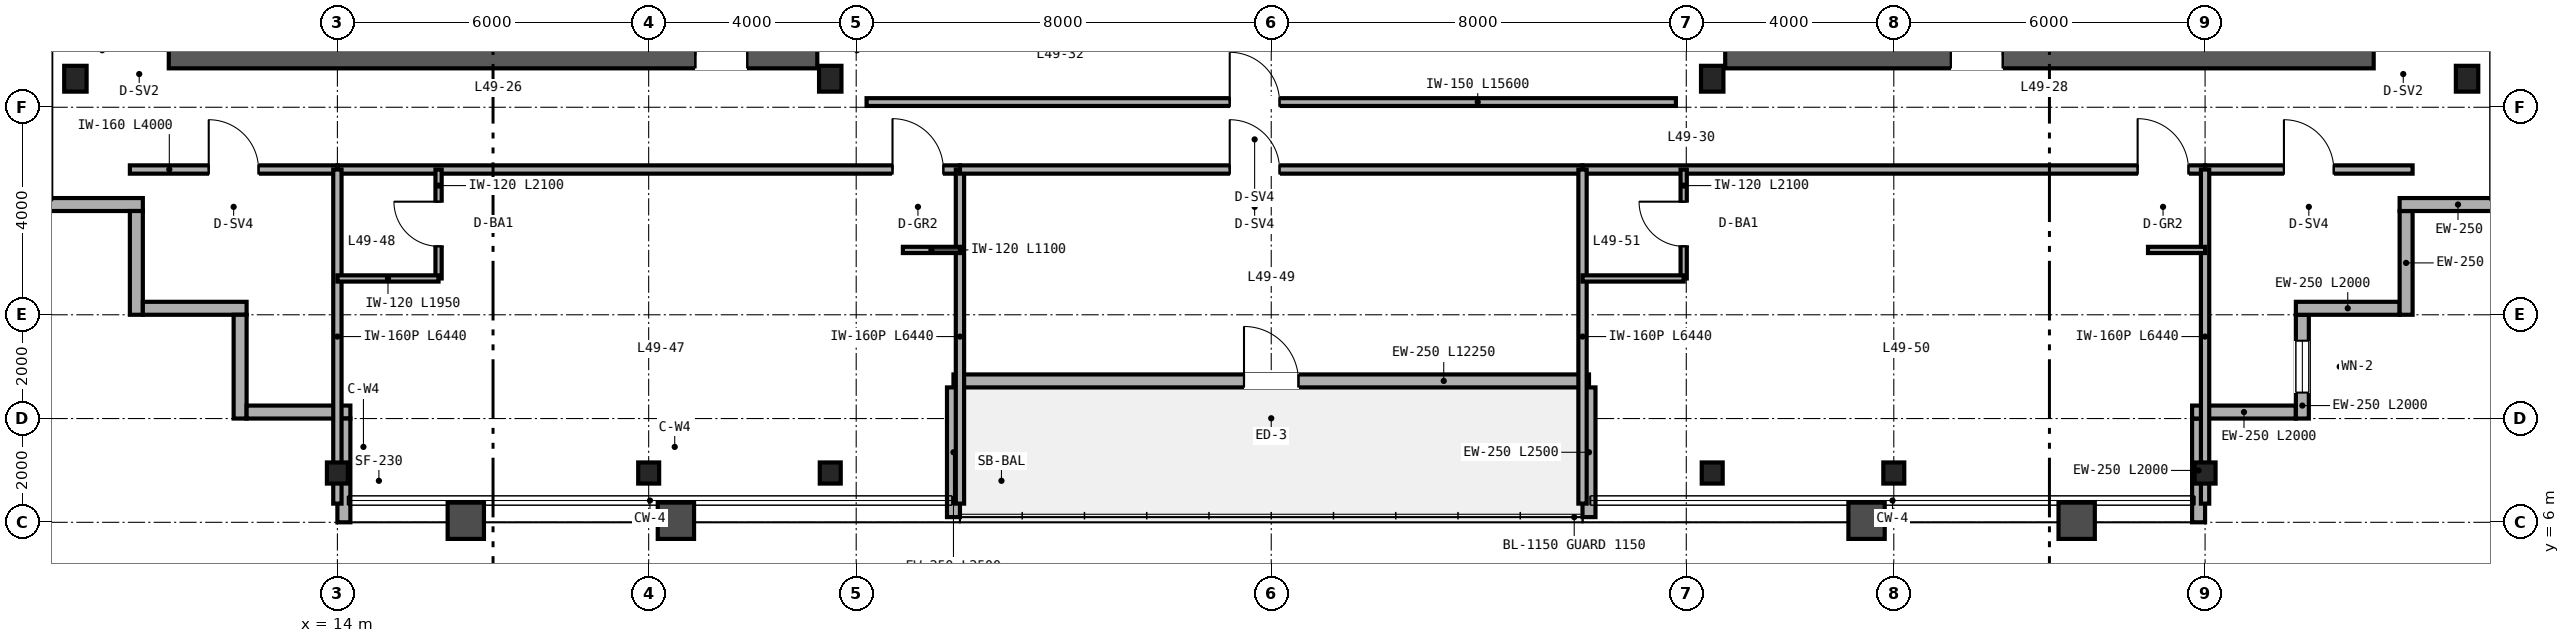
"""IFC4 building model, lengths in metres.
Left out: names, types, materials, properties, quantities, classifications, styles, units other than length and angle.
Written with IfcOpenShell. Run it as: python <this file> out.ifc"""

import sys

from ifc_helpers import new_model, si_unit, direction, frame, frame_2d, origin, origin_2d, place, context, subcontext, project, spatial, rectangle, i_section, extrude, source, transform, mapped, element, fill, save


model = new_model("IFC4")
c1 = context("Model", 3, precision=1e-05, world=origin(), true_north=direction((0.0, 1.0)))
c2 = subcontext(c1, "Body", "Model", "MODEL_VIEW")
j1 = project(units=[si_unit("LENGTHUNIT", "METRE"), si_unit("PLANEANGLEUNIT", "RADIAN")], contexts=[c1])
p1 = place(None, origin())
s1 = spatial("IfcSite", under=j1, at=p1, CompositionType="ELEMENT")
p2 = place(p1, origin())
s2 = spatial("IfcBuilding", under=s1, at=p2, CompositionType="ELEMENT")
p3 = place(p2, frame((0.0, 0.0, 195.6)))
s3 = spatial("IfcBuildingStorey", under=s2, at=p3, CompositionType="ELEMENT", Elevation=195.6)
p4 = place(p3, frame((10.75, 15.0, 0.0), z_axis=(0.0, 0.0, 1.0), x_axis=(1.0, 0.0, 0.0)))
e1 = element("IfcWall", 1, at=p4, inside=s3, PredefinedType="SHEAR", context=c2, shape_type="SweptSolid", body=[
    extrude(rectangle(XDim=12.5, YDim=0.5, at=frame_2d((6.25, 0.0))), origin(), (0.0, 0.0, 1.0), 3.37),
])
p5 = place(p4, frame((10.15, 0.0, 0.0)))
e2 = element("IfcOpeningElement", 2, at=p5, cuts=e1, PredefinedType="OPENING", context=c2, shape_type="SweptSolid", body=[
    extrude(rectangle(XDim=1.0, YDim=2.15, at=frame_2d((0.5, 1.075))), frame((0.0, 0.26, 0.0), z_axis=(0.0, -1.0, 0.0), x_axis=(1.0, 0.0, 0.0)), (0.0, 0.0, 1.0), 0.52),
])
p6 = place(p3, frame((40.75, 15.0, 0.0), z_axis=(0.0, 0.0, 1.0), x_axis=(1.0, 0.0, 0.0)))
e3 = element("IfcWall", 3, at=p6, inside=s3, PredefinedType="SHEAR", context=c2, shape_type="SweptSolid", body=[
    extrude(rectangle(XDim=12.5, YDim=0.5, at=frame_2d((6.25, 0.0))), origin(), (0.0, 0.0, 1.0), 3.37),
])
p7 = place(p6, frame((4.35, 0.0, 0.0)))
e4 = element("IfcOpeningElement", 4, at=p7, cuts=e3, PredefinedType="OPENING", context=c2, shape_type="SweptSolid", body=[
    extrude(rectangle(XDim=1.0, YDim=2.15, at=frame_2d((0.5, 1.075))), frame((0.0, 0.26, 0.0), z_axis=(0.0, -1.0, 0.0), x_axis=(1.0, 0.0, 0.0)), (0.0, 0.0, 1.0), 0.52),
])
m1 = source(origin(), c2, "Body", "SweptSolid", [
    extrude(i_section(OverallWidth=0.432, OverallDepth=0.498, WebThickness=0.056, FlangeThickness=0.089, FilletRadius=0.025, at=origin_2d()), origin(), (0.0, 0.0, 1.0), 3.37),
])
for number, where, z_axis, x_axis in (
    (5, (8.95, 14.55, 0.0), (0.0, 0.0, 1.0), (1.0, 0.0, 0.0)),
    (6, (23.5, 14.55, 0.0), (0.0, 0.0, 1.0), (1.0, 0.0, 0.0)),
    (7, (40.5, 14.55, 0.0), (0.0, 0.0, 1.0), (1.0, 0.0, 0.0)),
    (8, (55.05, 14.55, 0.0), (0.0, 0.0, 1.0), (1.0, 0.0, 0.0)),
):
    element("IfcColumn", number, at=place(p3, frame(where, z_axis=z_axis, x_axis=x_axis)), inside=s3, PredefinedType="COLUMN", context=c2, shape_type="MappedRepresentation", body=[
        mapped(m1, transform((0.0, 0.0, 0.0), scale=1.0)),
    ])
m2 = source(origin(), c2, "Body", "SweptSolid", [
    extrude(i_section(OverallWidth=0.404, OverallDepth=0.407, WebThickness=0.027, FlangeThickness=0.044, FilletRadius=0.025, at=origin_2d()), origin(), (0.0, 0.0, 1.0), 3.37),
])
for number, where, z_axis, x_axis in (
    (9, (14.0, 6.95, 0.0), (0.0, 0.0, 1.0), (1.0, 0.0, 0.0)),
    (10, (20.0, 6.95, 0.0), (0.0, 0.0, 1.0), (1.0, 0.0, 0.0)),
    (11, (23.5, 6.95, 0.0), (0.0, 0.0, 1.0), (1.0, 0.0, 0.0)),
    (12, (40.5, 6.95, 0.0), (0.0, 0.0, 1.0), (1.0, 0.0, 0.0)),
    (13, (44.0, 6.95, 0.0), (0.0, 0.0, 1.0), (1.0, 0.0, 0.0)),
    (14, (50.0, 6.95, 0.0), (0.0, 0.0, 1.0), (1.0, 0.0, 0.0)),
):
    element("IfcColumn", number, at=place(p3, frame(where, z_axis=z_axis, x_axis=x_axis)), inside=s3, PredefinedType="COLUMN", context=c2, shape_type="MappedRepresentation", body=[
        mapped(m2, transform((0.0, 0.0, 0.0), scale=1.0)),
    ])
p8 = place(p3, frame((49.875, 6.0, 0.0), z_axis=(0.0, 0.0, 1.0), x_axis=(0.0, 1.0, 0.0)))
e15 = element("IfcWall", 15, at=p8, inside=s3, PredefinedType="SOLIDWALL", context=c2, shape_type="SweptSolid", body=[
    extrude(rectangle(XDim=2.0, YDim=0.25, at=frame_2d((1.0, 0.0))), origin(), (0.0, 0.0, 1.0), 2.677),
])
p9 = place(p3, frame((49.75, 8.125, 0.0), z_axis=(0.0, 0.0, 1.0), x_axis=(1.0, 0.0, 0.0)))
e16 = element("IfcWall", 16, at=p9, inside=s3, PredefinedType="SOLIDWALL", context=c2, shape_type="SweptSolid", body=[
    extrude(rectangle(XDim=2.0, YDim=0.25, at=frame_2d((1.0, 0.0))), origin(), (0.0, 0.0, 1.0), 3.37),
])
p10 = place(p3, frame((51.875, 8.0, 0.0), z_axis=(0.0, 0.0, 1.0), x_axis=(0.0, 1.0, 0.0)))
e17 = element("IfcWall", 17, at=p10, inside=s3, PredefinedType="SOLIDWALL", context=c2, shape_type="SweptSolid", body=[
    extrude(rectangle(XDim=2.0, YDim=0.25, at=frame_2d((1.0, 0.0))), origin(), (0.0, 0.0, 1.0), 3.37),
])
p11 = place(p10, frame((0.5, 0.0, 0.85)))
e18 = element("IfcOpeningElement", 18, at=p11, cuts=e17, PredefinedType="OPENING", context=c2, shape_type="SweptSolid", body=[
    extrude(rectangle(XDim=1.0, YDim=1.9, at=frame_2d((0.5, 0.95))), frame((0.0, 0.135, 0.0), z_axis=(0.0, -1.0, 0.0), x_axis=(1.0, 0.0, 0.0)), (0.0, 0.0, 1.0), 0.27),
])
for number, where, z_axis, x_axis in (
    (19, (51.75, 10.125, 0.0), (0.0, 0.0, 1.0), (1.0, 0.0, 0.0)),
    (20, (53.875, 10.0, 0.0), (0.0, 0.0, 1.0), (0.0, 1.0, 0.0)),
):
    element("IfcWall", number, at=place(p3, frame(where, z_axis=z_axis, x_axis=x_axis)), inside=s3, PredefinedType="SOLIDWALL", context=c2, shape_type="SweptSolid", body=[
        extrude(rectangle(XDim=2.0, YDim=0.25, at=frame_2d((1.0, 0.0))), origin(), (0.0, 0.0, 1.0), 3.37),
    ])
for number, where, z_axis, x_axis in (
    (21, (53.75, 12.125, 0.0), (0.0, 0.0, 1.0), (1.0, 0.0, 0.0)),
    (22, (8.0, 12.125, 0.0), (0.0, 0.0, 1.0), (1.0, 0.0, 0.0)),
):
    element("IfcWall", number, at=place(p3, frame(where, z_axis=z_axis, x_axis=x_axis)), inside=s3, PredefinedType="SOLIDWALL", context=c2, shape_type="SweptSolid", body=[
        extrude(rectangle(XDim=2.25, YDim=0.25, at=frame_2d((1.125, 0.0))), origin(), (0.0, 0.0, 1.0), 3.37),
    ])
for number, where, z_axis, x_axis in (
    (23, (10.125, 12.0, 0.0), (0.0, 0.0, 1.0), (0.0, -1.0, 0.0)),
    (24, (10.25, 10.125, 0.0), (0.0, 0.0, 1.0), (1.0, 0.0, 0.0)),
    (25, (12.125, 10.0, 0.0), (0.0, 0.0, 1.0), (0.0, -1.0, 0.0)),
    (26, (12.25, 8.125, 0.0), (0.0, 0.0, 1.0), (1.0, 0.0, 0.0)),
):
    element("IfcWall", number, at=place(p3, frame(where, z_axis=z_axis, x_axis=x_axis)), inside=s3, PredefinedType="SOLIDWALL", context=c2, shape_type="SweptSolid", body=[
        extrude(rectangle(XDim=2.0, YDim=0.25, at=frame_2d((1.0, 0.0))), origin(), (0.0, 0.0, 1.0), 3.37),
    ])
p12 = place(p3, frame((14.125, 8.0, 0.0), z_axis=(0.0, 0.0, 1.0), x_axis=(0.0, -1.0, 0.0)))
e27 = element("IfcWall", 27, at=p12, inside=s3, PredefinedType="SOLIDWALL", context=c2, shape_type="SweptSolid", body=[
    extrude(rectangle(XDim=2.0, YDim=0.25, at=frame_2d((1.0, 0.0))), origin(), (0.0, 0.0, 1.0), 2.677),
])
p13 = place(p3, frame((25.875, 8.725, 0.0), z_axis=(0.0, 0.0, 1.0), x_axis=(1.0, 0.0, 0.0)))
e28 = element("IfcWall", 28, at=p13, inside=s3, PredefinedType="SOLIDWALL", context=c2, shape_type="SweptSolid", body=[
    extrude(rectangle(XDim=12.25, YDim=0.25, at=frame_2d((6.125, 0.0))), origin(), (0.0, 0.0, 1.0), 3.37),
])
p14 = place(p13, frame((5.6, 0.0, 0.0)))
e29 = element("IfcOpeningElement", 29, at=p14, cuts=e28, PredefinedType="OPENING", context=c2, shape_type="SweptSolid", body=[
    extrude(rectangle(XDim=1.05, YDim=2.15, at=frame_2d((0.525, 1.075))), frame((0.0, 0.135, 0.0), z_axis=(0.0, -1.0, 0.0), x_axis=(1.0, 0.0, 0.0)), (0.0, 0.0, 1.0), 0.27),
])
for number, where, z_axis, x_axis in (
    (30, (25.875, 6.1, 0.0), (0.0, 0.0, 1.0), (0.0, 1.0, 0.0)),
    (31, (38.125, 6.1, 0.0), (0.0, 0.0, 1.0), (0.0, 1.0, 0.0)),
):
    element("IfcWall", number, at=place(p3, frame(where, z_axis=z_axis, x_axis=x_axis)), inside=s3, PredefinedType="SOLIDWALL", context=c2, shape_type="SweptSolid", body=[
        extrude(rectangle(XDim=2.5, YDim=0.25, at=frame_2d((1.25, 0.0))), origin(), (0.0, 0.0, 1.0), 2.443),
    ])
p15 = place(p3, frame((24.2, 14.1, 0.0), z_axis=(0.0, 0.0, 1.0), x_axis=(1.0, 0.0, 0.0)))
e32 = element("IfcWall", 32, at=p15, inside=s3, PredefinedType="PARTITIONING", context=c2, shape_type="SweptSolid", body=[
    extrude(rectangle(XDim=15.6, YDim=0.15, at=frame_2d((7.8, 0.0))), origin(), (0.0, 0.0, 1.0), 3.37),
])
p16 = place(p15, frame((7.0, 0.0, 0.0)))
e33 = element("IfcOpeningElement", 33, at=p16, cuts=e32, PredefinedType="OPENING", context=c2, shape_type="SweptSolid", body=[
    extrude(rectangle(XDim=0.96, YDim=2.15, at=frame_2d((0.48, 1.075))), frame((0.0, 0.085, 0.0), z_axis=(0.0, -1.0, 0.0), x_axis=(1.0, 0.0, 0.0)), (0.0, 0.0, 1.0), 0.17),
])
p17 = place(p3, frame((10.0, 12.8, 0.0), z_axis=(0.0, 0.0, 1.0), x_axis=(1.0, 0.0, 0.0)))
e34 = element("IfcWall", 34, at=p17, inside=s3, PredefinedType="PARTITIONING", context=c2, shape_type="SweptSolid", body=[
    extrude(rectangle(XDim=4.0, YDim=0.16, at=frame_2d((2.0, 0.0))), origin(), (0.0, 0.0, 1.0), 3.37),
])
p18 = place(p17, frame((1.52, 0.0, 0.0)))
e35 = element("IfcOpeningElement", 35, at=p18, cuts=e34, PredefinedType="OPENING", context=c2, shape_type="SweptSolid", body=[
    extrude(rectangle(XDim=0.96, YDim=2.15, at=frame_2d((0.48, 1.075))), frame((0.0, 0.09, 0.0), z_axis=(0.0, -1.0, 0.0), x_axis=(1.0, 0.0, 0.0)), (0.0, 0.0, 1.0), 0.18),
])
p19 = place(p3, frame((50.0, 12.8, 0.0), z_axis=(0.0, 0.0, 1.0), x_axis=(1.0, 0.0, 0.0)))
e36 = element("IfcWall", 36, at=p19, inside=s3, PredefinedType="PARTITIONING", context=c2, shape_type="SweptSolid", body=[
    extrude(rectangle(XDim=4.0, YDim=0.16, at=frame_2d((2.0, 0.0))), origin(), (0.0, 0.0, 1.0), 3.37),
])
p20 = place(p19, frame((1.52, 0.0, 0.0)))
e37 = element("IfcOpeningElement", 37, at=p20, cuts=e36, PredefinedType="OPENING", context=c2, shape_type="SweptSolid", body=[
    extrude(rectangle(XDim=0.96, YDim=2.15, at=frame_2d((0.48, 1.075))), frame((0.0, 0.09, 0.0), z_axis=(0.0, -1.0, 0.0), x_axis=(1.0, 0.0, 0.0)), (0.0, 0.0, 1.0), 0.18),
])
p21 = place(p3, frame((14.0, 12.8, 0.0), z_axis=(0.0, 0.0, 1.0), x_axis=(1.0, 0.0, 0.0)))
e38 = element("IfcWall", 38, at=p21, inside=s3, PredefinedType="PARTITIONING", context=c2, shape_type="SweptSolid", body=[
    extrude(rectangle(XDim=12.0, YDim=0.16, at=frame_2d((6.0, 0.0))), origin(), (0.0, 0.0, 1.0), 2.913),
])
p22 = place(p21, frame((10.7, 0.0, 0.0)))
e39 = element("IfcOpeningElement", 39, at=p22, cuts=e38, PredefinedType="OPENING", context=c2, shape_type="SweptSolid", body=[
    extrude(rectangle(XDim=0.98, YDim=2.2, at=frame_2d((0.49, 1.1))), frame((0.0, 0.09, 0.0), z_axis=(0.0, -1.0, 0.0), x_axis=(1.0, 0.0, 0.0)), (0.0, 0.0, 1.0), 0.18),
])
p23 = place(p3, frame((14.0, 6.36, 0.0), z_axis=(0.0, 0.0, 1.0), x_axis=(0.0, 1.0, 0.0)))
e40 = element("IfcWall", 40, at=p23, inside=s3, PredefinedType="PARTITIONING", context=c2, shape_type="SweptSolid", body=[
    extrude(rectangle(XDim=6.44, YDim=0.16, at=frame_2d((3.22, 0.0))), origin(), (0.0, 0.0, 1.0), 2.677),
])
p24 = place(p3, frame((26.0, 6.36, 0.0), z_axis=(0.0, 0.0, 1.0), x_axis=(0.0, 1.0, 0.0)))
e41 = element("IfcWall", 41, at=p24, inside=s3, PredefinedType="PARTITIONING", context=c2, shape_type="SweptSolid", body=[
    extrude(rectangle(XDim=6.44, YDim=0.16, at=frame_2d((3.22, 0.0))), origin(), (0.0, 0.0, 1.0), 2.443),
])
p25 = place(p3, frame((15.95, 10.7, 0.0), z_axis=(0.0, 0.0, 1.0), x_axis=(0.0, 1.0, 0.0)))
e42 = element("IfcWall", 42, at=p25, inside=s3, PredefinedType="PARTITIONING", context=c2, shape_type="SweptSolid", body=[
    extrude(rectangle(XDim=2.1, YDim=0.12, at=frame_2d((1.05, 0.0))), origin(), (0.0, 0.0, 1.0), 3.37),
])
p26 = place(p25, frame((0.62, 0.0, 0.0)))
e43 = element("IfcOpeningElement", 43, at=p26, cuts=e42, PredefinedType="OPENING", context=c2, shape_type="SweptSolid", body=[
    extrude(rectangle(XDim=0.86, YDim=2.1, at=frame_2d((0.43, 1.05))), frame((0.0, 0.07, 0.0), z_axis=(0.0, -1.0, 0.0), x_axis=(1.0, 0.0, 0.0)), (0.0, 0.0, 1.0), 0.14),
])
p27 = place(p3, frame((14.0, 10.7, 0.0), z_axis=(0.0, 0.0, 1.0), x_axis=(1.0, 0.0, 0.0)))
e44 = element("IfcWall", 44, at=p27, inside=s3, PredefinedType="PARTITIONING", context=c2, shape_type="SweptSolid", body=[
    extrude(rectangle(XDim=1.95, YDim=0.12, at=frame_2d((0.975, 0.0))), origin(), (0.0, 0.0, 1.0), 3.37),
])
p28 = place(p3, frame((24.9, 11.25, 0.0), z_axis=(0.0, 0.0, 1.0), x_axis=(1.0, 0.0, 0.0)))
e45 = element("IfcWall", 45, at=p28, inside=s3, PredefinedType="PARTITIONING", context=c2, shape_type="SweptSolid", body=[
    extrude(rectangle(XDim=1.1, YDim=0.12, at=frame_2d((0.55, 0.0))), origin(), (0.0, 0.0, 1.0), 3.37),
])
p29 = place(p3, frame((26.0, 12.8, 0.0), z_axis=(0.0, 0.0, 1.0), x_axis=(1.0, 0.0, 0.0)))
e46 = element("IfcWall", 46, at=p29, inside=s3, PredefinedType="PARTITIONING", context=c2, shape_type="SweptSolid", body=[
    extrude(rectangle(XDim=12.0, YDim=0.16, at=frame_2d((6.0, 0.0))), origin(), (0.0, 0.0, 1.0), 3.37),
])
p30 = place(p29, frame((5.2, 0.0, 0.0)))
e47 = element("IfcOpeningElement", 47, at=p30, cuts=e46, PredefinedType="OPENING", context=c2, shape_type="SweptSolid", body=[
    extrude(rectangle(XDim=0.96, YDim=2.15, at=frame_2d((0.48, 1.075))), frame((0.0, 0.09, 0.0), z_axis=(0.0, -1.0, 0.0), x_axis=(1.0, 0.0, 0.0)), (0.0, 0.0, 1.0), 0.18),
])
p31 = place(p3, frame((38.0, 12.8, 0.0), z_axis=(0.0, 0.0, 1.0), x_axis=(1.0, 0.0, 0.0)))
e48 = element("IfcWall", 48, at=p31, inside=s3, PredefinedType="PARTITIONING", context=c2, shape_type="SweptSolid", body=[
    extrude(rectangle(XDim=12.0, YDim=0.16, at=frame_2d((6.0, 0.0))), origin(), (0.0, 0.0, 1.0), 2.913),
])
p32 = place(p31, frame((10.7, 0.0, 0.0)))
e49 = element("IfcOpeningElement", 49, at=p32, cuts=e48, PredefinedType="OPENING", context=c2, shape_type="SweptSolid", body=[
    extrude(rectangle(XDim=0.98, YDim=2.2, at=frame_2d((0.49, 1.1))), frame((0.0, 0.09, 0.0), z_axis=(0.0, -1.0, 0.0), x_axis=(1.0, 0.0, 0.0)), (0.0, 0.0, 1.0), 0.18),
])
p33 = place(p3, frame((38.0, 6.36, 0.0), z_axis=(0.0, 0.0, 1.0), x_axis=(0.0, 1.0, 0.0)))
e50 = element("IfcWall", 50, at=p33, inside=s3, PredefinedType="PARTITIONING", context=c2, shape_type="SweptSolid", body=[
    extrude(rectangle(XDim=6.44, YDim=0.16, at=frame_2d((3.22, 0.0))), origin(), (0.0, 0.0, 1.0), 2.443),
])
p34 = place(p3, frame((50.0, 6.36, 0.0), z_axis=(0.0, 0.0, 1.0), x_axis=(0.0, 1.0, 0.0)))
e51 = element("IfcWall", 51, at=p34, inside=s3, PredefinedType="PARTITIONING", context=c2, shape_type="SweptSolid", body=[
    extrude(rectangle(XDim=6.44, YDim=0.16, at=frame_2d((3.22, 0.0))), origin(), (0.0, 0.0, 1.0), 2.677),
])
p35 = place(p3, frame((39.95, 10.7, 0.0), z_axis=(0.0, 0.0, 1.0), x_axis=(0.0, 1.0, 0.0)))
e52 = element("IfcWall", 52, at=p35, inside=s3, PredefinedType="PARTITIONING", context=c2, shape_type="SweptSolid", body=[
    extrude(rectangle(XDim=2.1, YDim=0.12, at=frame_2d((1.05, 0.0))), origin(), (0.0, 0.0, 1.0), 3.37),
])
p36 = place(p35, frame((0.62, 0.0, 0.0)))
e53 = element("IfcOpeningElement", 53, at=p36, cuts=e52, PredefinedType="OPENING", context=c2, shape_type="SweptSolid", body=[
    extrude(rectangle(XDim=0.86, YDim=2.1, at=frame_2d((0.43, 1.05))), frame((0.0, 0.07, 0.0), z_axis=(0.0, -1.0, 0.0), x_axis=(1.0, 0.0, 0.0)), (0.0, 0.0, 1.0), 0.14),
])
p37 = place(p3, frame((38.0, 10.7, 0.0), z_axis=(0.0, 0.0, 1.0), x_axis=(1.0, 0.0, 0.0)))
e54 = element("IfcWall", 54, at=p37, inside=s3, PredefinedType="PARTITIONING", context=c2, shape_type="SweptSolid", body=[
    extrude(rectangle(XDim=1.95, YDim=0.12, at=frame_2d((0.975, 0.0))), origin(), (0.0, 0.0, 1.0), 3.37),
])
p38 = place(p3, frame((48.9, 11.25, 0.0), z_axis=(0.0, 0.0, 1.0), x_axis=(1.0, 0.0, 0.0)))
e55 = element("IfcWall", 55, at=p38, inside=s3, PredefinedType="PARTITIONING", context=c2, shape_type="SweptSolid", body=[
    extrude(rectangle(XDim=1.1, YDim=0.12, at=frame_2d((0.55, 0.0))), origin(), (0.0, 0.0, 1.0), 3.37),
])
m3 = source(origin(), c2, "Body", "SweptSolid", [
    extrude(rectangle(XDim=1.0, YDim=1.9, at=frame_2d((0.5, 0.95))), frame((0.0, 0.03, 0.0), z_axis=(0.0, -1.0, 0.0), x_axis=(1.0, 0.0, 0.0)), (0.0, 0.0, 1.0), 0.06),
])
p39 = place(p11, origin())
e56 = element("IfcWindow", 56, at=p39, inside=s3, PartitioningType="SINGLE_PANEL", PredefinedType="WINDOW", context=c2, shape_type="MappedRepresentation", body=[
    mapped(m3, transform((0.0, 0.0, 0.0), scale=1.0)),
])
fill(e18, e56)
m4 = source(origin(), c2, "Body", "SweptSolid", [
    extrude(rectangle(XDim=1.05, YDim=2.15, at=frame_2d((0.525, 1.075))), frame((0.0, 0.025, 0.0), z_axis=(0.0, -1.0, 0.0), x_axis=(1.0, 0.0, 0.0)), (0.0, 0.0, 1.0), 0.05),
])
p40 = place(p14, origin())
e57 = element("IfcDoor", 57, at=p40, inside=s3, OperationType="SINGLE_SWING_LEFT", PredefinedType="DOOR", context=c2, shape_type="MappedRepresentation", body=[
    mapped(m4, transform((0.0, 0.0, 0.0), scale=1.0)),
])
fill(e29, e57)
m5 = source(origin(), c2, "Body", "SweptSolid", [
    extrude(rectangle(XDim=1.0, YDim=2.15, at=frame_2d((0.5, 1.075))), frame((0.0, 0.025, 0.0), z_axis=(0.0, -1.0, 0.0), x_axis=(1.0, 0.0, 0.0)), (0.0, 0.0, 1.0), 0.05),
])
p41 = place(p5, origin())
e58 = element("IfcDoor", 58, at=p41, inside=s3, OperationType="SINGLE_SWING_LEFT", PredefinedType="DOOR", context=c2, shape_type="MappedRepresentation", body=[
    mapped(m5, transform((0.0, 0.0, 0.0), scale=1.0)),
])
fill(e2, e58)
p42 = place(p7, origin())
e59 = element("IfcDoor", 59, at=p42, inside=s3, OperationType="SINGLE_SWING_RIGHT", PredefinedType="DOOR", context=c2, shape_type="MappedRepresentation", body=[
    mapped(m5, transform((0.0, 0.0, 0.0), scale=1.0)),
])
fill(e4, e59)
m6 = source(origin(), c2, "Body", "SweptSolid", [
    extrude(rectangle(XDim=0.96, YDim=2.15, at=frame_2d((0.48, 1.075))), frame((0.0, 0.025, 0.0), z_axis=(0.0, -1.0, 0.0), x_axis=(1.0, 0.0, 0.0)), (0.0, 0.0, 1.0), 0.05),
])
p43 = place(p16, origin())
e60 = element("IfcDoor", 60, at=p43, inside=s3, OperationType="SINGLE_SWING_LEFT", PredefinedType="DOOR", context=c2, shape_type="MappedRepresentation", body=[
    mapped(m6, transform((0.0, 0.0, 0.0), scale=1.0)),
])
fill(e33, e60)
p44 = place(p18, origin())
e61 = element("IfcDoor", 61, at=p44, inside=s3, OperationType="SINGLE_SWING_LEFT", PredefinedType="DOOR", context=c2, shape_type="MappedRepresentation", body=[
    mapped(m6, transform((0.0, 0.0, 0.0), scale=1.0)),
])
fill(e35, e61)
p45 = place(p20, origin())
e62 = element("IfcDoor", 62, at=p45, inside=s3, OperationType="SINGLE_SWING_LEFT", PredefinedType="DOOR", context=c2, shape_type="MappedRepresentation", body=[
    mapped(m6, transform((0.0, 0.0, 0.0), scale=1.0)),
])
fill(e37, e62)
m7 = source(origin(), c2, "Body", "SweptSolid", [
    extrude(rectangle(XDim=0.86, YDim=2.1, at=frame_2d((0.43, 1.05))), frame((0.0, 0.025, 0.0), z_axis=(0.0, -1.0, 0.0), x_axis=(1.0, 0.0, 0.0)), (0.0, 0.0, 1.0), 0.05),
])
p46 = place(p26, origin())
e63 = element("IfcDoor", 63, at=p46, inside=s3, OperationType="SINGLE_SWING_RIGHT", PredefinedType="DOOR", context=c2, shape_type="MappedRepresentation", body=[
    mapped(m7, transform((0.0, 0.0, 0.0), scale=1.0)),
])
fill(e43, e63)
m8 = source(origin(), c2, "Body", "SweptSolid", [
    extrude(rectangle(XDim=0.98, YDim=2.2, at=frame_2d((0.49, 1.1))), frame((0.0, 0.025, 0.0), z_axis=(0.0, -1.0, 0.0), x_axis=(1.0, 0.0, 0.0)), (0.0, 0.0, 1.0), 0.05),
])
p47 = place(p22, origin())
e64 = element("IfcDoor", 64, at=p47, inside=s3, OperationType="SINGLE_SWING_LEFT", PredefinedType="DOOR", context=c2, shape_type="MappedRepresentation", body=[
    mapped(m8, transform((0.0, 0.0, 0.0), scale=1.0)),
])
fill(e39, e64)
p48 = place(p30, origin())
e65 = element("IfcDoor", 65, at=p48, inside=s3, OperationType="SINGLE_SWING_LEFT", PredefinedType="DOOR", context=c2, shape_type="MappedRepresentation", body=[
    mapped(m6, transform((0.0, 0.0, 0.0), scale=1.0)),
])
fill(e47, e65)
p49 = place(p36, origin())
e66 = element("IfcDoor", 66, at=p49, inside=s3, OperationType="SINGLE_SWING_RIGHT", PredefinedType="DOOR", context=c2, shape_type="MappedRepresentation", body=[
    mapped(m7, transform((0.0, 0.0, 0.0), scale=1.0)),
])
fill(e53, e66)
p50 = place(p32, origin())
e67 = element("IfcDoor", 67, at=p50, inside=s3, OperationType="SINGLE_SWING_LEFT", PredefinedType="DOOR", context=c2, shape_type="MappedRepresentation", body=[
    mapped(m8, transform((0.0, 0.0, 0.0), scale=1.0)),
])
fill(e49, e67)
save(model, sys.argv[1])
